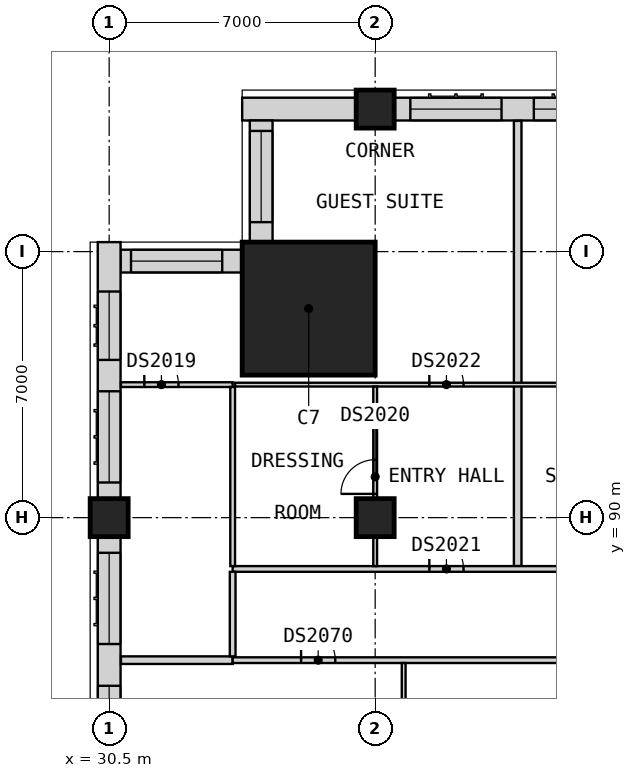
"""IFC4 building model, lengths in metres.
Left out: names, types, materials, properties, quantities, classifications, styles, units other than length and angle.
Written with IfcOpenShell. Run it as: python <this file> out.ifc"""

import sys

from ifc_helpers import new_model, si_unit, direction, frame, frame_2d, origin, origin_2d, place, context, subcontext, project, spatial, rectangle, extrude, element, fill, save


model = new_model("IFC4")
c1 = context("Model", 3, precision=1e-05, world=origin(), true_north=direction((0.0, 1.0)))
c2 = subcontext(c1, "Body", "Model", "MODEL_VIEW")
j1 = project(units=[si_unit("LENGTHUNIT", "METRE"), si_unit("PLANEANGLEUNIT", "RADIAN")], contexts=[c1])
p1 = place(None, origin())
s1 = spatial("IfcSite", under=j1, at=p1, CompositionType="ELEMENT")
p2 = place(p1, origin())
s2 = spatial("IfcBuilding", under=s1, at=p2, CompositionType="ELEMENT")
p3 = place(p2, frame((0.0, 0.0, 133.8)))
s3 = spatial("IfcBuildingStorey", under=s2, at=p3, CompositionType="ELEMENT", Elevation=133.8)
for number, where, z_axis, x_axis in (
    (1, (37.5, 100.75, 0.0), (0.0, 0.0, 1.0), (1.0, 0.0, 0.0)),
    (2, (30.5, 90.0, 0.0), (0.0, 0.0, 1.0), (1.0, 0.0, 0.0)),
    (3, (37.5, 90.0, 0.0), (0.0, 0.0, 1.0), (1.0, 0.0, 0.0)),
):
    element("IfcColumn", number, at=place(p3, frame(where, z_axis=z_axis, x_axis=x_axis)), inside=s3, PredefinedType="COLUMN", context=c2, shape_type="SweptSolid", body=[
        extrude(rectangle(XDim=1.0, YDim=1.0, at=origin_2d()), origin(), (0.0, 0.0, 1.0), 3.6),
    ])
p4 = place(p3, frame((35.75, 95.5, 0.0), z_axis=(0.0, 0.0, 1.0), x_axis=(1.0, 0.0, 0.0)))
e4 = element("IfcColumn", 4, at=p4, inside=s3, PredefinedType="COLUMN", context=c2, shape_type="SweptSolid", body=[
    extrude(rectangle(XDim=3.5, YDim=3.5, at=origin_2d()), origin(), (0.0, 0.0, 1.0), 3.6),
])
p5 = place(p3, frame((44.5, 100.75, 0.0), z_axis=(0.0, 0.0, 1.0), x_axis=(-1.0, 0.0, 0.0)))
e5 = element("IfcWall", 5, at=p5, inside=s3, PredefinedType="SOLIDWALL", context=c2, shape_type="SweptSolid", body=[
    extrude(rectangle(XDim=6.5, YDim=0.6, at=frame_2d((3.25, 0.0))), origin(), (0.0, 0.0, 1.0), 2.85),
])
p6 = place(p5, frame((3.675, 0.0, 0.8)))
e6 = element("IfcOpeningElement", 6, at=p6, cuts=e5, PredefinedType="OPENING", context=c2, shape_type="SweptSolid", body=[
    extrude(rectangle(XDim=2.4, YDim=1.8, at=frame_2d((1.2, 0.9))), frame((0.0, 0.31, 0.0), z_axis=(0.0, -1.0, 0.0), x_axis=(1.0, 0.0, 0.0)), (0.0, 0.0, 1.0), 0.62),
])
p7 = place(p5, frame((0.425, 0.0, 0.8)))
e7 = element("IfcOpeningElement", 7, at=p7, cuts=e5, PredefinedType="OPENING", context=c2, shape_type="SweptSolid", body=[
    extrude(rectangle(XDim=2.4, YDim=1.8, at=frame_2d((1.2, 0.9))), frame((0.0, 0.31, 0.0), z_axis=(0.0, -1.0, 0.0), x_axis=(1.0, 0.0, 0.0)), (0.0, 0.0, 1.0), 0.62),
])
p8 = place(p3, frame((37.0, 100.75, 0.0), z_axis=(0.0, 0.0, 1.0), x_axis=(-1.0, 0.0, 0.0)))
e8 = element("IfcWall", 8, at=p8, inside=s3, PredefinedType="SOLIDWALL", context=c2, shape_type="SweptSolid", body=[
    extrude(rectangle(XDim=3.0, YDim=0.6, at=frame_2d((1.5, 0.0))), origin(), (0.0, 0.0, 1.0), 3.35),
])
p9 = place(p3, frame((34.5, 100.45, 0.0), z_axis=(0.0, 0.0, 1.0), x_axis=(0.0, -1.0, 0.0)))
e9 = element("IfcWall", 9, at=p9, inside=s3, PredefinedType="SOLIDWALL", context=c2, shape_type="SweptSolid", body=[
    extrude(rectangle(XDim=3.2, YDim=0.6, at=frame_2d((1.6, 0.0))), origin(), (0.0, 0.0, 1.0), 3.35),
])
p10 = place(p9, frame((0.275, 0.0, 0.8)))
e10 = element("IfcOpeningElement", 10, at=p10, cuts=e9, PredefinedType="OPENING", context=c2, shape_type="SweptSolid", body=[
    extrude(rectangle(XDim=2.4, YDim=1.8, at=frame_2d((1.2, 0.9))), frame((0.0, 0.31, 0.0), z_axis=(0.0, -1.0, 0.0), x_axis=(1.0, 0.0, 0.0)), (0.0, 0.0, 1.0), 0.62),
])
p11 = place(p3, frame((34.0, 96.75, 0.0), z_axis=(0.0, 0.0, 1.0), x_axis=(-1.0, 0.0, 0.0)))
e11 = element("IfcWall", 11, at=p11, inside=s3, PredefinedType="SOLIDWALL", context=c2, shape_type="SweptSolid", body=[
    extrude(rectangle(XDim=3.2, YDim=0.6, at=frame_2d((1.6, 0.0))), origin(), (0.0, 0.0, 1.0), 3.35),
])
p12 = place(p11, frame((0.525, 0.0, 0.8)))
e12 = element("IfcOpeningElement", 12, at=p12, cuts=e11, PredefinedType="OPENING", context=c2, shape_type="SweptSolid", body=[
    extrude(rectangle(XDim=2.4, YDim=1.8, at=frame_2d((1.2, 0.9))), frame((0.0, 0.31, 0.0), z_axis=(0.0, -1.0, 0.0), x_axis=(1.0, 0.0, 0.0)), (0.0, 0.0, 1.0), 0.62),
])
p13 = place(p3, frame((30.5, 97.25, 0.0), z_axis=(0.0, 0.0, 1.0), x_axis=(0.0, -1.0, 0.0)))
e13 = element("IfcWall", 13, at=p13, inside=s3, PredefinedType="SOLIDWALL", context=c2, shape_type="SweptSolid", body=[
    extrude(rectangle(XDim=6.75, YDim=0.6, at=frame_2d((3.375, 0.0))), origin(), (0.0, 0.0, 1.0), 2.85),
])
p14 = place(p13, frame((3.925, 0.0, 0.8)))
e14 = element("IfcOpeningElement", 14, at=p14, cuts=e13, PredefinedType="OPENING", context=c2, shape_type="SweptSolid", body=[
    extrude(rectangle(XDim=2.4, YDim=1.8, at=frame_2d((1.2, 0.9))), frame((0.0, 0.31, 0.0), z_axis=(0.0, -1.0, 0.0), x_axis=(1.0, 0.0, 0.0)), (0.0, 0.0, 1.0), 0.62),
])
p15 = place(p13, frame((1.3, 0.0, 0.8)))
e15 = element("IfcOpeningElement", 15, at=p15, cuts=e13, PredefinedType="OPENING", context=c2, shape_type="SweptSolid", body=[
    extrude(rectangle(XDim=1.8, YDim=1.8, at=frame_2d((0.9, 0.9))), frame((0.0, 0.31, 0.0), z_axis=(0.0, -1.0, 0.0), x_axis=(1.0, 0.0, 0.0)), (0.0, 0.0, 1.0), 0.62),
])
p16 = place(p3, frame((30.5, 89.5, 0.0), z_axis=(0.0, 0.0, 1.0), x_axis=(0.0, -1.0, 0.0)))
e16 = element("IfcWall", 16, at=p16, inside=s3, PredefinedType="SOLIDWALL", context=c2, shape_type="SweptSolid", body=[
    extrude(rectangle(XDim=7.0, YDim=0.6, at=frame_2d((3.5, 0.0))), origin(), (0.0, 0.0, 1.0), 3.35),
])
p17 = place(p16, frame((3.925, 0.0, 0.8)))
e17 = element("IfcOpeningElement", 17, at=p17, cuts=e16, PredefinedType="OPENING", context=c2, shape_type="SweptSolid", body=[
    extrude(rectangle(XDim=2.4, YDim=1.8, at=frame_2d((1.2, 0.9))), frame((0.0, 0.31, 0.0), z_axis=(0.0, -1.0, 0.0), x_axis=(1.0, 0.0, 0.0)), (0.0, 0.0, 1.0), 0.62),
])
p18 = place(p16, frame((0.425, 0.0, 0.8)))
e18 = element("IfcOpeningElement", 18, at=p18, cuts=e16, PredefinedType="OPENING", context=c2, shape_type="SweptSolid", body=[
    extrude(rectangle(XDim=2.4, YDim=1.8, at=frame_2d((1.2, 0.9))), frame((0.0, 0.31, 0.0), z_axis=(0.0, -1.0, 0.0), x_axis=(1.0, 0.0, 0.0)), (0.0, 0.0, 1.0), 0.62),
])
p19 = place(p3, frame((30.81, 86.25, 0.0), z_axis=(0.0, 0.0, 1.0), x_axis=(1.0, 0.0, 0.0)))
e19 = element("IfcWall", 19, at=p19, inside=s3, PredefinedType="PARTITIONING", context=c2, shape_type="SweptSolid", body=[
    extrude(rectangle(XDim=2.94, YDim=0.2, at=frame_2d((1.47, 0.0))), origin(), (0.0, 0.0, 1.0), 3.35),
])
p20 = place(p3, frame((41.25, 88.725, 0.0), z_axis=(0.0, 0.0, 1.0), x_axis=(0.0, 1.0, 0.0)))
e20 = element("IfcWall", 20, at=p20, inside=s3, PredefinedType="PARTITIONING", context=c2, shape_type="SweptSolid", body=[
    extrude(rectangle(XDim=11.715, YDim=0.2, at=frame_2d((5.857, 0.0))), origin(), (0.0, 0.0, 1.0), 3.35),
])
p21 = place(p3, frame((33.75, 86.25, 0.0), z_axis=(0.0, 0.0, 1.0), x_axis=(1.0, 0.0, 0.0)))
e21 = element("IfcWall", 21, at=p21, inside=s3, PredefinedType="PARTITIONING", context=c2, shape_type="SweptSolid", body=[
    extrude(rectangle(XDim=37.5, YDim=0.15, at=frame_2d((18.75, 0.0))), origin(), (0.0, 0.0, 1.0), 3.35),
])
p22 = place(p21, frame((1.8, 0.0, 0.0)))
e22 = element("IfcOpeningElement", 22, at=p22, cuts=e21, PredefinedType="OPENING", context=c2, shape_type="SweptSolid", body=[
    extrude(rectangle(XDim=0.9, YDim=2.1, at=frame_2d((0.45, 1.05))), frame((0.0, 0.085, 0.0), z_axis=(0.0, -1.0, 0.0), x_axis=(1.0, 0.0, 0.0)), (0.0, 0.0, 1.0), 0.17),
])
p23 = place(p3, frame((33.75, 88.65, 0.0), z_axis=(0.0, 0.0, 1.0), x_axis=(1.0, 0.0, 0.0)))
e23 = element("IfcWall", 23, at=p23, inside=s3, PredefinedType="PARTITIONING", context=c2, shape_type="SweptSolid", body=[
    extrude(rectangle(XDim=39.9, YDim=0.15, at=frame_2d((19.95, 0.0))), origin(), (0.0, 0.0, 1.0), 3.35),
])
p24 = place(p23, frame((5.175, 0.0, 0.0)))
e24 = element("IfcOpeningElement", 24, at=p24, cuts=e23, PredefinedType="OPENING", context=c2, shape_type="SweptSolid", body=[
    extrude(rectangle(XDim=0.9, YDim=2.1, at=frame_2d((0.45, 1.05))), frame((0.0, 0.085, 0.0), z_axis=(0.0, -1.0, 0.0), x_axis=(1.0, 0.0, 0.0)), (0.0, 0.0, 1.0), 0.17),
])
p25 = place(p23, frame((9.3, 0.0, 0.0)))
e25 = element("IfcOpeningElement", 25, at=p25, cuts=e23, PredefinedType="OPENING", context=c2, shape_type="SweptSolid", body=[
    extrude(rectangle(XDim=0.9, YDim=2.1, at=frame_2d((0.45, 1.05))), frame((0.0, 0.085, 0.0), z_axis=(0.0, -1.0, 0.0), x_axis=(1.0, 0.0, 0.0)), (0.0, 0.0, 1.0), 0.17),
])
p26 = place(p23, frame((21.113, 0.0, 0.0)))
e26 = element("IfcOpeningElement", 26, at=p26, cuts=e23, PredefinedType="OPENING", context=c2, shape_type="SweptSolid", body=[
    extrude(rectangle(XDim=0.9, YDim=2.1, at=frame_2d((0.45, 1.05))), frame((0.0, 0.085, 0.0), z_axis=(0.0, -1.0, 0.0), x_axis=(1.0, 0.0, 0.0)), (0.0, 0.0, 1.0), 0.17),
])
p27 = place(p23, frame((28.05, 0.0, 0.0)))
e27 = element("IfcOpeningElement", 27, at=p27, cuts=e23, PredefinedType="OPENING", context=c2, shape_type="SweptSolid", body=[
    extrude(rectangle(XDim=0.9, YDim=2.1, at=frame_2d((0.45, 1.05))), frame((0.0, 0.085, 0.0), z_axis=(0.0, -1.0, 0.0), x_axis=(1.0, 0.0, 0.0)), (0.0, 0.0, 1.0), 0.17),
])
p28 = place(p23, frame((35.55, 0.0, 0.0)))
e28 = element("IfcOpeningElement", 28, at=p28, cuts=e23, PredefinedType="OPENING", context=c2, shape_type="SweptSolid", body=[
    extrude(rectangle(XDim=0.9, YDim=2.1, at=frame_2d((0.45, 1.05))), frame((0.0, 0.085, 0.0), z_axis=(0.0, -1.0, 0.0), x_axis=(1.0, 0.0, 0.0)), (0.0, 0.0, 1.0), 0.17),
])
p29 = place(p23, frame((38.25, 0.0, 0.0)))
e29 = element("IfcOpeningElement", 29, at=p29, cuts=e23, PredefinedType="OPENING", context=c2, shape_type="SweptSolid", body=[
    extrude(rectangle(XDim=0.9, YDim=2.1, at=frame_2d((0.45, 1.05))), frame((0.0, 0.085, 0.0), z_axis=(0.0, -1.0, 0.0), x_axis=(1.0, 0.0, 0.0)), (0.0, 0.0, 1.0), 0.17),
])
p30 = place(p3, frame((33.75, 86.35, 0.0), z_axis=(0.0, 0.0, 1.0), x_axis=(0.0, 1.0, 0.0)))
e30 = element("IfcWall", 30, at=p30, inside=s3, PredefinedType="PARTITIONING", context=c2, shape_type="SweptSolid", body=[
    extrude(rectangle(XDim=2.225, YDim=0.15, at=frame_2d((1.112, 0.0))), origin(), (0.0, 0.0, 1.0), 3.35),
])
p31 = place(p3, frame((33.812, 93.5, 0.0), z_axis=(0.0, 0.0, 1.0), x_axis=(1.0, 0.0, 0.0)))
e31 = element("IfcWall", 31, at=p31, inside=s3, PredefinedType="PARTITIONING", context=c2, shape_type="SweptSolid", body=[
    extrude(rectangle(XDim=11.875, YDim=0.1, at=frame_2d((5.938, 0.0))), origin(), (0.0, 0.0, 1.0), 3.35),
])
p32 = place(p31, frame((5.113, 0.0, 0.0)))
e32 = element("IfcOpeningElement", 32, at=p32, cuts=e31, PredefinedType="OPENING", context=c2, shape_type="SweptSolid", body=[
    extrude(rectangle(XDim=0.9, YDim=2.1, at=frame_2d((0.45, 1.05))), frame((0.0, 0.06, 0.0), z_axis=(0.0, -1.0, 0.0), x_axis=(1.0, 0.0, 0.0)), (0.0, 0.0, 1.0), 0.12),
])
p33 = place(p31, frame((9.238, 0.0, 0.0)))
e33 = element("IfcOpeningElement", 33, at=p33, cuts=e31, PredefinedType="OPENING", context=c2, shape_type="SweptSolid", body=[
    extrude(rectangle(XDim=0.9, YDim=2.1, at=frame_2d((0.45, 1.05))), frame((0.0, 0.06, 0.0), z_axis=(0.0, -1.0, 0.0), x_axis=(1.0, 0.0, 0.0)), (0.0, 0.0, 1.0), 0.12),
])
p34 = place(p3, frame((37.5, 88.725, 0.0), z_axis=(0.0, 0.0, 1.0), x_axis=(0.0, 1.0, 0.0)))
e34 = element("IfcWall", 34, at=p34, inside=s3, PredefinedType="PARTITIONING", context=c2, shape_type="SweptSolid", body=[
    extrude(rectangle(XDim=4.725, YDim=0.1, at=frame_2d((2.362, 0.0))), origin(), (0.0, 0.0, 1.0), 3.35),
])
p35 = place(p34, frame((1.9, 0.0, 0.0)))
e35 = element("IfcOpeningElement", 35, at=p35, cuts=e34, PredefinedType="OPENING", context=c2, shape_type="SweptSolid", body=[
    extrude(rectangle(XDim=0.9, YDim=2.1, at=frame_2d((0.45, 1.05))), frame((0.0, 0.06, 0.0), z_axis=(0.0, -1.0, 0.0), x_axis=(1.0, 0.0, 0.0)), (0.0, 0.0, 1.0), 0.12),
])
p36 = place(p3, frame((38.25, 82.5, 0.0), z_axis=(0.0, 0.0, 1.0), x_axis=(0.0, 1.0, 0.0)))
e36 = element("IfcWall", 36, at=p36, inside=s3, PredefinedType="PARTITIONING", context=c2, shape_type="SweptSolid", body=[
    extrude(rectangle(XDim=3.675, YDim=0.1, at=frame_2d((1.837, 0.0))), origin(), (0.0, 0.0, 1.0), 3.35),
])
p37 = place(p3, frame((30.81, 93.5, 0.0), z_axis=(0.0, 0.0, 1.0), x_axis=(1.0, 0.0, 0.0)))
e37 = element("IfcWall", 37, at=p37, inside=s3, PredefinedType="PARTITIONING", context=c2, shape_type="SweptSolid", body=[
    extrude(rectangle(XDim=2.94, YDim=0.125, at=frame_2d((1.47, 0.0))), origin(), (0.0, 0.0, 1.0), 3.35),
])
p38 = place(p37, frame((0.615, 0.0, 0.0)))
e38 = element("IfcOpeningElement", 38, at=p38, cuts=e37, PredefinedType="OPENING", context=c2, shape_type="SweptSolid", body=[
    extrude(rectangle(XDim=0.9, YDim=2.1, at=frame_2d((0.45, 1.05))), frame((0.0, 0.073, 0.0), z_axis=(0.0, -1.0, 0.0), x_axis=(1.0, 0.0, 0.0)), (0.0, 0.0, 1.0), 0.145),
])
p39 = place(p3, frame((33.75, 88.725, 0.0), z_axis=(0.0, 0.0, 1.0), x_axis=(0.0, 1.0, 0.0)))
e39 = element("IfcWall", 39, at=p39, inside=s3, PredefinedType="PARTITIONING", context=c2, shape_type="SweptSolid", body=[
    extrude(rectangle(XDim=4.712, YDim=0.125, at=frame_2d((2.356, 0.0))), origin(), (0.0, 0.0, 1.0), 3.35),
])
p40 = place(p6, origin())
e40 = element("IfcWindow", 40, at=p40, inside=s3, PartitioningType="SINGLE_PANEL", PredefinedType="WINDOW", context=c2, shape_type="SweptSolid", body=[
    extrude(rectangle(XDim=2.4, YDim=1.8, at=frame_2d((1.2, 0.9))), frame((0.0, -0.07, 0.0), z_axis=(0.0, -1.0, 0.0), x_axis=(1.0, 0.0, 0.0)), (0.0, 0.0, 1.0), 0.06),
])
fill(e6, e40)
p41 = place(p7, origin())
e41 = element("IfcWindow", 41, at=p41, inside=s3, PartitioningType="SINGLE_PANEL", PredefinedType="WINDOW", context=c2, shape_type="SweptSolid", body=[
    extrude(rectangle(XDim=2.4, YDim=1.8, at=frame_2d((1.2, 0.9))), frame((0.0, -0.07, 0.0), z_axis=(0.0, -1.0, 0.0), x_axis=(1.0, 0.0, 0.0)), (0.0, 0.0, 1.0), 0.06),
])
fill(e7, e41)
p42 = place(p10, origin())
e42 = element("IfcWindow", 42, at=p42, inside=s3, PartitioningType="SINGLE_PANEL", PredefinedType="WINDOW", context=c2, shape_type="SweptSolid", body=[
    extrude(rectangle(XDim=2.4, YDim=1.8, at=frame_2d((1.2, 0.9))), frame((0.0, -0.07, 0.0), z_axis=(0.0, -1.0, 0.0), x_axis=(1.0, 0.0, 0.0)), (0.0, 0.0, 1.0), 0.06),
])
fill(e10, e42)
p43 = place(p12, origin())
e43 = element("IfcWindow", 43, at=p43, inside=s3, PartitioningType="SINGLE_PANEL", PredefinedType="WINDOW", context=c2, shape_type="SweptSolid", body=[
    extrude(rectangle(XDim=2.4, YDim=1.8, at=frame_2d((1.2, 0.9))), frame((0.0, -0.07, 0.0), z_axis=(0.0, -1.0, 0.0), x_axis=(1.0, 0.0, 0.0)), (0.0, 0.0, 1.0), 0.06),
])
fill(e12, e43)
p44 = place(p14, origin())
e44 = element("IfcWindow", 44, at=p44, inside=s3, PartitioningType="SINGLE_PANEL", PredefinedType="WINDOW", context=c2, shape_type="SweptSolid", body=[
    extrude(rectangle(XDim=2.4, YDim=1.8, at=frame_2d((1.2, 0.9))), frame((0.0, -0.07, 0.0), z_axis=(0.0, -1.0, 0.0), x_axis=(1.0, 0.0, 0.0)), (0.0, 0.0, 1.0), 0.06),
])
fill(e14, e44)
p45 = place(p15, origin())
e45 = element("IfcWindow", 45, at=p45, inside=s3, PartitioningType="SINGLE_PANEL", PredefinedType="WINDOW", context=c2, shape_type="SweptSolid", body=[
    extrude(rectangle(XDim=1.8, YDim=1.8, at=frame_2d((0.9, 0.9))), frame((0.0, -0.07, 0.0), z_axis=(0.0, -1.0, 0.0), x_axis=(1.0, 0.0, 0.0)), (0.0, 0.0, 1.0), 0.06),
])
fill(e15, e45)
p46 = place(p17, origin())
e46 = element("IfcWindow", 46, at=p46, inside=s3, PartitioningType="SINGLE_PANEL", PredefinedType="WINDOW", context=c2, shape_type="SweptSolid", body=[
    extrude(rectangle(XDim=2.4, YDim=1.8, at=frame_2d((1.2, 0.9))), frame((0.0, -0.07, 0.0), z_axis=(0.0, -1.0, 0.0), x_axis=(1.0, 0.0, 0.0)), (0.0, 0.0, 1.0), 0.06),
])
fill(e17, e46)
p47 = place(p18, origin())
e47 = element("IfcWindow", 47, at=p47, inside=s3, PartitioningType="SINGLE_PANEL", PredefinedType="WINDOW", context=c2, shape_type="SweptSolid", body=[
    extrude(rectangle(XDim=2.4, YDim=1.8, at=frame_2d((1.2, 0.9))), frame((0.0, -0.07, 0.0), z_axis=(0.0, -1.0, 0.0), x_axis=(1.0, 0.0, 0.0)), (0.0, 0.0, 1.0), 0.06),
])
fill(e18, e47)
p48 = place(p38, origin())
e48 = element("IfcDoor", 48, at=p48, inside=s3, OperationType="SINGLE_SWING_RIGHT", PredefinedType="DOOR", context=c2, shape_type="SweptSolid", body=[
    extrude(rectangle(XDim=0.9, YDim=2.1, at=frame_2d((0.45, 1.05))), frame((0.0, 0.025, 0.0), z_axis=(0.0, -1.0, 0.0), x_axis=(1.0, 0.0, 0.0)), (0.0, 0.0, 1.0), 0.05),
])
fill(e38, e48)
p49 = place(p35, origin())
e49 = element("IfcDoor", 49, at=p49, inside=s3, OperationType="SINGLE_SWING_RIGHT", PredefinedType="DOOR", context=c2, shape_type="SweptSolid", body=[
    extrude(rectangle(XDim=0.9, YDim=2.1, at=frame_2d((0.45, 1.05))), frame((0.0, 0.025, 0.0), z_axis=(0.0, -1.0, 0.0), x_axis=(1.0, 0.0, 0.0)), (0.0, 0.0, 1.0), 0.05),
])
fill(e35, e49)
p50 = place(p24, origin())
e50 = element("IfcDoor", 50, at=p50, inside=s3, OperationType="SINGLE_SWING_LEFT", PredefinedType="DOOR", context=c2, shape_type="SweptSolid", body=[
    extrude(rectangle(XDim=0.9, YDim=2.1, at=frame_2d((0.45, 1.05))), frame((0.0, 0.025, 0.0), z_axis=(0.0, -1.0, 0.0), x_axis=(1.0, 0.0, 0.0)), (0.0, 0.0, 1.0), 0.05),
])
fill(e24, e50)
p51 = place(p32, origin())
e51 = element("IfcDoor", 51, at=p51, inside=s3, OperationType="SINGLE_SWING_RIGHT", PredefinedType="DOOR", context=c2, shape_type="SweptSolid", body=[
    extrude(rectangle(XDim=0.9, YDim=2.1, at=frame_2d((0.45, 1.05))), frame((0.0, 0.025, 0.0), z_axis=(0.0, -1.0, 0.0), x_axis=(1.0, 0.0, 0.0)), (0.0, 0.0, 1.0), 0.05),
])
fill(e32, e51)
p52 = place(p22, origin())
e52 = element("IfcDoor", 52, at=p52, inside=s3, OperationType="SINGLE_SWING_RIGHT", PredefinedType="DOOR", context=c2, shape_type="SweptSolid", body=[
    extrude(rectangle(XDim=0.9, YDim=2.1, at=frame_2d((0.45, 1.05))), frame((0.0, 0.025, 0.0), z_axis=(0.0, -1.0, 0.0), x_axis=(1.0, 0.0, 0.0)), (0.0, 0.0, 1.0), 0.05),
])
fill(e22, e52)
save(model, sys.argv[1])
